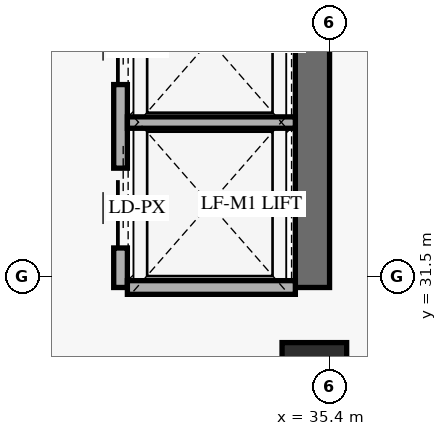
"""IFC4 building model, lengths in metres.
Left out: names, types, materials, properties, quantities, classifications, styles, units other than length and angle.
Written with IfcOpenShell. Run it as: python <this file> out.ifc"""

import sys

from ifc_helpers import new_model, si_unit, direction, frame, frame_2d, origin, origin_2d, place, context, subcontext, project, spatial, rectangle, extrude, element, fill, save


model = new_model("IFC4")
c1 = context("Model", 3, precision=1e-05, world=origin(), true_north=direction((0.0, 1.0)))
c2 = subcontext(c1, "Body", "Model", "MODEL_VIEW")
j1 = project(units=[si_unit("LENGTHUNIT", "METRE"), si_unit("PLANEANGLEUNIT", "RADIAN")], contexts=[c1])
p1 = place(None, origin())
s1 = spatial("IfcSite", under=j1, at=p1, CompositionType="ELEMENT")
p2 = place(p1, origin())
s2 = spatial("IfcBuilding", under=s1, at=p2, CompositionType="ELEMENT")
p3 = place(p2, frame((0.0, 0.0, 98.4)))
s3 = spatial("IfcBuildingStorey", under=s2, at=p3, CompositionType="ELEMENT", Elevation=98.4)
p4 = place(p3, frame((35.175, 31.35, 0.0), z_axis=(0.0, 0.0, 1.0), x_axis=(0.0, 1.0, 0.0)))
e1 = element("IfcWall", 1, at=p4, inside=s3, PredefinedType="SHEAR", context=c2, shape_type="SweptSolid", body=[
    extrude(rectangle(XDim=6.975, YDim=0.45, at=frame_2d((3.487, 0.0))), origin(), (0.0, 0.0, 1.0), 3.349),
])
p5 = place(p3, frame((35.2, 30.2, 0.0), z_axis=(0.0, 0.0, 1.0), x_axis=(1.0, 0.0, 0.0)))
e2 = element("IfcColumn", 2, at=p5, inside=s3, PredefinedType="COLUMN", context=c2, shape_type="SweptSolid", body=[
    extrude(rectangle(XDim=0.85, YDim=0.85, at=origin_2d()), origin(), (0.0, 0.0, 1.0), 4.2),
])
p6 = place(p3, frame((32.65, 31.35, 0.0), z_axis=(0.0, 0.0, 1.0), x_axis=(0.0, 1.0, 0.0)))
e3 = element("IfcWall", 3, at=p6, inside=s3, PredefinedType="STANDARD", context=c2, shape_type="SweptSolid", body=[
    extrude(rectangle(XDim=7.175, YDim=0.18, at=frame_2d((3.587, 0.0))), origin(), (0.0, 0.0, 1.0), 3.96),
])
p7 = place(p6, frame((0.52, 0.0, 0.0)))
e4 = element("IfcOpeningElement", 4, at=p7, cuts=e3, PredefinedType="OPENING", context=c2, shape_type="SweptSolid", body=[
    extrude(rectangle(XDim=1.05, YDim=2.2, at=frame_2d((0.525, 1.1))), frame((0.0, 0.1, 0.0), z_axis=(0.0, -1.0, 0.0), x_axis=(1.0, 0.0, 0.0)), (0.0, 0.0, 1.0), 0.2),
])
p8 = place(p6, frame((2.67, 0.0, 0.0)))
e5 = element("IfcOpeningElement", 5, at=p8, cuts=e3, PredefinedType="OPENING", context=c2, shape_type="SweptSolid", body=[
    extrude(rectangle(XDim=1.05, YDim=2.2, at=frame_2d((0.525, 1.1))), frame((0.0, 0.1, 0.0), z_axis=(0.0, -1.0, 0.0), x_axis=(1.0, 0.0, 0.0)), (0.0, 0.0, 1.0), 0.2),
])
p9 = place(p6, frame((4.82, 0.0, 0.0)))
e6 = element("IfcOpeningElement", 6, at=p9, cuts=e3, PredefinedType="OPENING", context=c2, shape_type="SweptSolid", body=[
    extrude(rectangle(XDim=1.05, YDim=2.2, at=frame_2d((0.525, 1.1))), frame((0.0, 0.1, 0.0), z_axis=(0.0, -1.0, 0.0), x_axis=(1.0, 0.0, 0.0)), (0.0, 0.0, 1.0), 0.2),
])
p10 = place(p3, frame((32.74, 31.35, 0.0), z_axis=(0.0, 0.0, 1.0), x_axis=(1.0, 0.0, 0.0)))
e7 = element("IfcWall", 7, at=p10, inside=s3, PredefinedType="STANDARD", context=c2, shape_type="SweptSolid", body=[
    extrude(rectangle(XDim=2.21, YDim=0.18, at=frame_2d((1.105, 0.0))), origin(), (0.0, 0.0, 1.0), 3.96),
])
p11 = place(p3, frame((32.74, 33.52, 0.0), z_axis=(0.0, 0.0, 1.0), x_axis=(1.0, 0.0, 0.0)))
e8 = element("IfcWall", 8, at=p11, inside=s3, PredefinedType="STANDARD", context=c2, shape_type="SweptSolid", body=[
    extrude(rectangle(XDim=2.21, YDim=0.15, at=frame_2d((1.105, 0.0))), origin(), (0.0, 0.0, 1.0), 3.96),
])
p12 = place(p7, origin())
e9 = element("IfcDoor", 9, at=p12, inside=s3, OperationType="SLIDING_TO_LEFT", PredefinedType="DOOR", context=c2, shape_type="SweptSolid", body=[
    extrude(rectangle(XDim=1.05, YDim=2.2, at=frame_2d((0.525, 1.1))), frame((0.0, 0.025, 0.0), z_axis=(0.0, -1.0, 0.0), x_axis=(1.0, 0.0, 0.0)), (0.0, 0.0, 1.0), 0.05),
])
fill(e4, e9)
p13 = place(p8, origin())
e10 = element("IfcDoor", 10, at=p13, inside=s3, OperationType="SLIDING_TO_LEFT", PredefinedType="DOOR", context=c2, shape_type="SweptSolid", body=[
    extrude(rectangle(XDim=1.05, YDim=2.2, at=frame_2d((0.525, 1.1))), frame((0.0, 0.025, 0.0), z_axis=(0.0, -1.0, 0.0), x_axis=(1.0, 0.0, 0.0)), (0.0, 0.0, 1.0), 0.05),
])
fill(e5, e10)
save(model, sys.argv[1])
